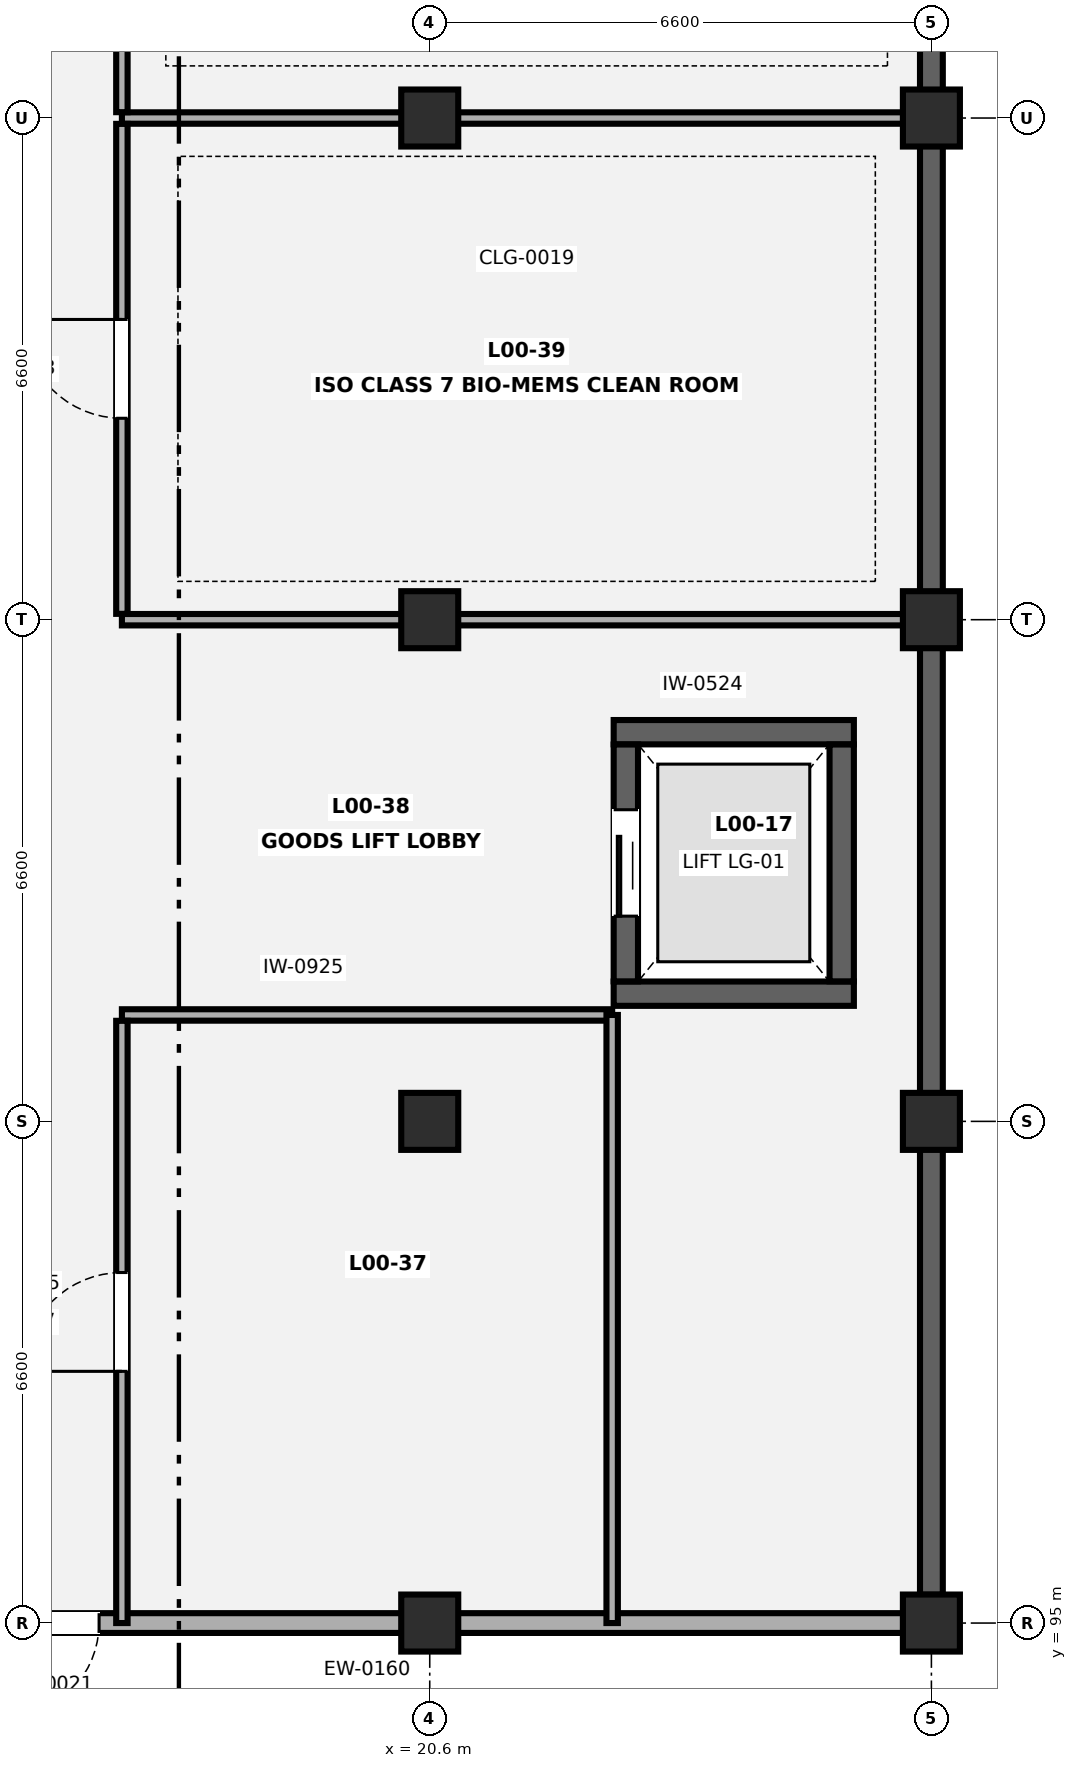
"""IFC4 building model, lengths in metres.
Left out: names, types, materials, properties, quantities, classifications, styles, units other than length and angle.
Written with IfcOpenShell. Run it as: python <this file> out.ifc"""

import sys

from ifc_helpers import new_model, si_unit, direction, frame, frame_2d, origin, origin_2d, place, context, subcontext, project, spatial, rectangle, extrude, element, fill, save


model = new_model("IFC4")
c1 = context("Model", 3, precision=1e-05, world=origin(), true_north=direction((0.0, 1.0)))
c2 = subcontext(c1, "Body", "Model", "MODEL_VIEW")
j1 = project(units=[si_unit("LENGTHUNIT", "METRE"), si_unit("PLANEANGLEUNIT", "RADIAN")], contexts=[c1])
p1 = place(None, origin())
s1 = spatial("IfcSite", under=j1, at=p1, CompositionType="ELEMENT")
p2 = place(p1, origin())
s2 = spatial("IfcBuilding", under=s1, at=p2, CompositionType="ELEMENT")
p3 = place(p2, origin())
s3 = spatial("IfcBuildingStorey", under=s2, at=p3, CompositionType="ELEMENT", Elevation=0.0)
for number, where, z_axis, x_axis in (
    (1, (20.6, 95.0, 0.0), (0.0, 0.0, 1.0), (1.0, 0.0, 0.0)),
    (2, (20.6, 101.6, 0.0), (0.0, 0.0, 1.0), (1.0, 0.0, 0.0)),
    (3, (20.6, 108.2, 0.0), (0.0, 0.0, 1.0), (1.0, 0.0, 0.0)),
    (4, (20.6, 114.8, 0.0), (0.0, 0.0, 1.0), (1.0, 0.0, 0.0)),
    (5, (27.2, 95.0, 0.0), (0.0, 0.0, 1.0), (1.0, 0.0, 0.0)),
    (6, (27.2, 101.6, 0.0), (0.0, 0.0, 1.0), (1.0, 0.0, 0.0)),
    (7, (27.2, 108.2, 0.0), (0.0, 0.0, 1.0), (1.0, 0.0, 0.0)),
    (8, (27.2, 114.8, 0.0), (0.0, 0.0, 1.0), (1.0, 0.0, 0.0)),
):
    element("IfcColumn", number, at=place(p3, frame(where, z_axis=z_axis, x_axis=x_axis)), inside=s3, PredefinedType="COLUMN", context=c2, shape_type="SweptSolid", body=[
        extrude(rectangle(XDim=0.75, YDim=0.75, at=origin_2d()), origin(), (0.0, 0.0, 1.0), 4.9),
    ])
p4 = place(p3, frame((27.2, 161.827, 0.0), z_axis=(0.0, 0.0, 1.0), x_axis=(0.0, -1.0, 0.0)))
e9 = element("IfcWall", 9, at=p4, inside=s3, PredefinedType="SOLIDWALL", context=c2, shape_type="SweptSolid", body=[
    extrude(rectangle(XDim=66.454, YDim=0.3, at=frame_2d((33.227, 0.0))), origin(), (0.0, 0.0, 1.0), 4.54),
])
p5 = place(p3, frame((26.827, 95.0, 0.0), z_axis=(0.0, 0.0, 1.0), x_axis=(-1.0, 0.0, 0.0)))
e10 = element("IfcWall", 10, at=p5, inside=s3, PredefinedType="SOLIDWALL", context=c2, shape_type="SweptSolid", body=[
    extrude(rectangle(XDim=19.054, YDim=0.26, at=frame_2d((9.527, 0.0))), origin(), (0.0, 0.0, 1.0), 3.135),
])
p6 = place(p5, frame((10.577, 0.0, 0.0)))
e11 = element("IfcOpeningElement", 11, at=p6, cuts=e10, PredefinedType="OPENING", context=c2, shape_type="SweptSolid", body=[
    extrude(rectangle(XDim=1.25, YDim=2.15, at=frame_2d((0.625, 1.075))), frame((0.0, 0.14, 0.0), z_axis=(0.0, -1.0, 0.0), x_axis=(1.0, 0.0, 0.0)), (0.0, 0.0, 1.0), 0.28),
])
for number, where, z_axis, x_axis in (
    (12, (23.02, 103.28, 0.0), (0.0, 0.0, 1.0), (1.0, 0.0, 0.0)),
    (13, (23.02, 106.72, 0.0), (0.0, 0.0, 1.0), (1.0, 0.0, 0.0)),
):
    element("IfcWall", number, at=place(p3, frame(where, z_axis=z_axis, x_axis=x_axis)), inside=s3, PredefinedType="SHEAR", context=c2, shape_type="SweptSolid", body=[
        extrude(rectangle(XDim=3.16, YDim=0.32, at=frame_2d((1.58, 0.0))), origin(), (0.0, 0.0, 1.0), 4.55),
    ])
p7 = place(p3, frame((23.18, 103.442, 0.0), z_axis=(0.0, 0.0, 1.0), x_axis=(0.0, 1.0, 0.0)))
e14 = element("IfcWall", 14, at=p7, inside=s3, PredefinedType="SHEAR", context=c2, shape_type="SweptSolid", body=[
    extrude(rectangle(XDim=3.116, YDim=0.32, at=frame_2d((1.558, 0.0))), origin(), (0.0, 0.0, 1.0), 4.55),
])
p8 = place(p7, frame((0.858, 0.0, 0.0)))
e15 = element("IfcOpeningElement", 15, at=p8, cuts=e14, PredefinedType="OPENING", context=c2, shape_type="SweptSolid", body=[
    extrude(rectangle(XDim=1.4, YDim=2.25, at=frame_2d((0.7, 1.125))), frame((0.0, 0.17, 0.0), z_axis=(0.0, -1.0, 0.0), x_axis=(1.0, 0.0, 0.0)), (0.0, 0.0, 1.0), 0.34),
])
p9 = place(p3, frame((26.02, 103.442, 0.0), z_axis=(0.0, 0.0, 1.0), x_axis=(0.0, 1.0, 0.0)))
e16 = element("IfcWall", 16, at=p9, inside=s3, PredefinedType="SHEAR", context=c2, shape_type="SweptSolid", body=[
    extrude(rectangle(XDim=3.116, YDim=0.32, at=frame_2d((1.558, 0.0))), origin(), (0.0, 0.0, 1.0), 4.55),
])
p10 = place(p3, frame((16.55, 103.0, 0.0), z_axis=(0.0, 0.0, 1.0), x_axis=(1.0, 0.0, 0.0)))
e17 = element("IfcWall", 17, at=p10, inside=s3, PredefinedType="PARTITIONING", context=c2, shape_type="SweptSolid", body=[
    extrude(rectangle(XDim=6.45, YDim=0.15, at=frame_2d((3.225, 0.0))), origin(), (0.0, 0.0, 1.0), 4.55),
])
p11 = place(p3, frame((16.55, 95.0, 0.0), z_axis=(0.0, 0.0, 1.0), x_axis=(0.0, 1.0, 0.0)))
e18 = element("IfcWall", 18, at=p11, inside=s3, PredefinedType="PARTITIONING", context=c2, shape_type="SweptSolid", body=[
    extrude(rectangle(XDim=7.923, YDim=0.15, at=frame_2d((3.961, 0.0))), origin(), (0.0, 0.0, 1.0), 4.55),
])
p12 = place(p11, frame((3.312, 0.0, 0.0)))
e19 = element("IfcOpeningElement", 19, at=p12, cuts=e18, PredefinedType="OPENING", context=c2, shape_type="SweptSolid", body=[
    extrude(rectangle(XDim=1.3, YDim=2.2, at=frame_2d((0.65, 1.1))), frame((0.0, 0.085, 0.0), z_axis=(0.0, -1.0, 0.0), x_axis=(1.0, 0.0, 0.0)), (0.0, 0.0, 1.0), 0.17),
])
p13 = place(p3, frame((23.0, 95.0, 0.0), z_axis=(0.0, 0.0, 1.0), x_axis=(0.0, 1.0, 0.0)))
e20 = element("IfcWall", 20, at=p13, inside=s3, PredefinedType="PARTITIONING", context=c2, shape_type="SweptSolid", body=[
    extrude(rectangle(XDim=8.0, YDim=0.15, at=frame_2d((4.0, 0.0))), origin(), (0.0, 0.0, 1.0), 4.55),
])
for number, where, z_axis, x_axis in (
    (21, (16.55, 108.2, 0.0), (0.0, 0.0, 1.0), (1.0, 0.0, 0.0)),
    (22, (16.55, 114.8, 0.0), (0.0, 0.0, 1.0), (1.0, 0.0, 0.0)),
):
    element("IfcWall", number, at=place(p3, frame(where, z_axis=z_axis, x_axis=x_axis)), inside=s3, PredefinedType="PARTITIONING", context=c2, shape_type="SweptSolid", body=[
        extrude(rectangle(XDim=10.508, YDim=0.15, at=frame_2d((5.254, 0.0))), origin(), (0.0, 0.0, 1.0), 3.135),
    ])
p14 = place(p3, frame((16.55, 108.277, 0.0), z_axis=(0.0, 0.0, 1.0), x_axis=(0.0, 1.0, 0.0)))
e23 = element("IfcWall", 23, at=p14, inside=s3, PredefinedType="PARTITIONING", context=c2, shape_type="SweptSolid", body=[
    extrude(rectangle(XDim=6.446, YDim=0.15, at=frame_2d((3.223, 0.0))), origin(), (0.0, 0.0, 1.0), 4.55),
])
p15 = place(p14, frame((2.573, 0.0, 0.0)))
e24 = element("IfcOpeningElement", 24, at=p15, cuts=e23, PredefinedType="OPENING", context=c2, shape_type="SweptSolid", body=[
    extrude(rectangle(XDim=1.3, YDim=2.2, at=frame_2d((0.65, 1.1))), frame((0.0, 0.085, 0.0), z_axis=(0.0, -1.0, 0.0), x_axis=(1.0, 0.0, 0.0)), (0.0, 0.0, 1.0), 0.17),
])
p16 = place(p3, frame((16.55, 114.877, 0.0), z_axis=(0.0, 0.0, 1.0), x_axis=(0.0, 1.0, 0.0)))
e25 = element("IfcWall", 25, at=p16, inside=s3, PredefinedType="PARTITIONING", context=c2, shape_type="SweptSolid", body=[
    extrude(rectangle(XDim=13.046, YDim=0.15, at=frame_2d((6.523, 0.0))), origin(), (0.0, 0.0, 1.0), 4.55),
])
p17 = place(p16, frame((5.873, 0.0, 0.0)))
e26 = element("IfcOpeningElement", 26, at=p17, cuts=e25, PredefinedType="OPENING", context=c2, shape_type="SweptSolid", body=[
    extrude(rectangle(XDim=1.3, YDim=2.2, at=frame_2d((0.65, 1.1))), frame((0.0, 0.085, 0.0), z_axis=(0.0, -1.0, 0.0), x_axis=(1.0, 0.0, 0.0)), (0.0, 0.0, 1.0), 0.17),
])
p18 = place(p6, origin())
e27 = element("IfcDoor", 27, at=p18, inside=s3, OperationType="SINGLE_SWING_RIGHT", PredefinedType="DOOR", context=c2, shape_type="SweptSolid", body=[
    extrude(rectangle(XDim=1.25, YDim=2.15, at=frame_2d((0.625, 1.075))), frame((0.0, 0.025, 0.0), z_axis=(0.0, -1.0, 0.0), x_axis=(1.0, 0.0, 0.0)), (0.0, 0.0, 1.0), 0.05),
])
fill(e11, e27)
p19 = place(p8, origin())
e28 = element("IfcDoor", 28, at=p19, inside=s3, OperationType="DOUBLE_DOOR_SLIDING", PredefinedType="DOOR", context=c2, shape_type="SweptSolid", body=[
    extrude(rectangle(XDim=1.4, YDim=2.25, at=frame_2d((0.7, 1.125))), frame((0.0, 0.025, 0.0), z_axis=(0.0, -1.0, 0.0), x_axis=(1.0, 0.0, 0.0)), (0.0, 0.0, 1.0), 0.05),
])
fill(e15, e28)
p20 = place(p12, origin())
e29 = element("IfcDoor", 29, at=p20, inside=s3, OperationType="SINGLE_SWING_LEFT", PredefinedType="DOOR", context=c2, shape_type="SweptSolid", body=[
    extrude(rectangle(XDim=1.3, YDim=2.2, at=frame_2d((0.65, 1.1))), frame((0.0, 0.025, 0.0), z_axis=(0.0, -1.0, 0.0), x_axis=(1.0, 0.0, 0.0)), (0.0, 0.0, 1.0), 0.05),
])
fill(e19, e29)
p21 = place(p15, origin())
e30 = element("IfcDoor", 30, at=p21, inside=s3, OperationType="SINGLE_SWING_RIGHT", PredefinedType="DOOR", context=c2, shape_type="SweptSolid", body=[
    extrude(rectangle(XDim=1.3, YDim=2.2, at=frame_2d((0.65, 1.1))), frame((0.0, 0.025, 0.0), z_axis=(0.0, -1.0, 0.0), x_axis=(1.0, 0.0, 0.0)), (0.0, 0.0, 1.0), 0.05),
])
fill(e24, e30)
save(model, sys.argv[1])
